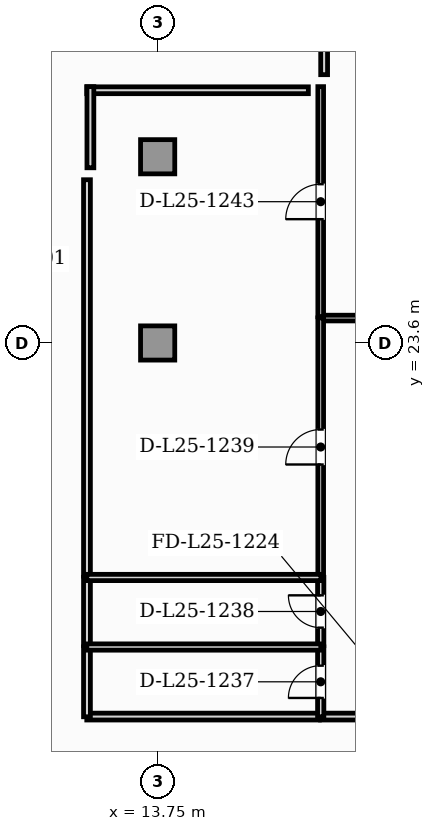
"""IFC4 building model, lengths in metres.
Left out: names, types, materials, properties, quantities, classifications, styles, units other than length and angle.
Written with IfcOpenShell. Run it as: python <this file> out.ifc"""

import sys

from ifc_helpers import new_model, si_unit, direction, frame, frame_2d, origin, origin_2d, place, context, subcontext, project, spatial, rectangle, extrude, element, fill, save


model = new_model("IFC4")
c1 = context("Model", 3, precision=1e-05, world=origin(), true_north=direction((0.0, 1.0)))
c2 = subcontext(c1, "Body", "Model", "MODEL_VIEW")
j1 = project(units=[si_unit("LENGTHUNIT", "METRE"), si_unit("PLANEANGLEUNIT", "RADIAN")], contexts=[c1])
p1 = place(None, origin())
s1 = spatial("IfcSite", under=j1, at=p1, CompositionType="ELEMENT")
p2 = place(p1, origin())
s2 = spatial("IfcBuilding", under=s1, at=p2, CompositionType="ELEMENT")
p3 = place(p2, frame((0.0, 0.0, 104.15)))
s3 = spatial("IfcBuildingStorey", under=s2, at=p3, CompositionType="ELEMENT", Elevation=104.15)
for number, where, z_axis, x_axis in (
    (1, (13.75, 23.6, 0.0), (0.0, 0.0, 1.0), (1.0, 0.0, 0.0)),
    (2, (13.75, 28.5, 0.0), (0.0, 0.0, 1.0), (1.0, 0.0, 0.0)),
):
    element("IfcColumn", number, at=place(p3, frame(where, z_axis=z_axis, x_axis=x_axis)), inside=s3, PredefinedType="COLUMN", context=c2, shape_type="SweptSolid", body=[
        extrude(rectangle(XDim=0.9, YDim=0.9, at=origin_2d()), origin(), (0.0, 0.0, 1.0), 3.85),
    ])
p4 = place(p3, frame((18.035, 13.77, 0.0), z_axis=(0.0, 0.0, 1.0), x_axis=(1.0, 0.0, 0.0)))
e3 = element("IfcWall", 3, at=p4, inside=s3, PredefinedType="PARTITIONING", context=c2, shape_type="SweptSolid", body=[
    extrude(rectangle(XDim=4.99, YDim=0.18, at=frame_2d((2.495, 0.0))), origin(), (0.0, 0.0, 1.0), 3.6),
])
p5 = place(p4, frame((1.995, 0.0, 0.0)))
e4 = element("IfcOpeningElement", 4, at=p5, cuts=e3, PredefinedType="OPENING", context=c2, shape_type="SweptSolid", body=[
    extrude(rectangle(XDim=1.0, YDim=2.15, at=frame_2d((0.5, 1.075))), frame((0.0, 0.1, 0.0), z_axis=(0.0, -1.0, 0.0), x_axis=(1.0, 0.0, 0.0)), (0.0, 0.0, 1.0), 0.2),
])
p6 = place(p3, frame((11.885, 13.77, 0.0), z_axis=(0.0, 0.0, 1.0), x_axis=(1.0, 0.0, 0.0)))
e5 = element("IfcWall", 5, at=p6, inside=s3, PredefinedType="PARTITIONING", context=c2, shape_type="SweptSolid", body=[
    extrude(rectangle(XDim=6.12, YDim=0.18, at=frame_2d((3.06, 0.0))), origin(), (0.0, 0.0, 1.0), 3.6),
])
p7 = place(p3, frame((11.89, 13.765, 0.0), z_axis=(0.0, 0.0, 1.0), x_axis=(0.0, 1.0, 0.0)))
e6 = element("IfcWall", 6, at=p7, inside=s3, PredefinedType="PARTITIONING", context=c2, shape_type="SweptSolid", body=[
    extrude(rectangle(XDim=1.84, YDim=0.18, at=frame_2d((0.92, 0.0))), origin(), (0.0, 0.0, 1.0), 3.6),
])
p8 = place(p3, frame((11.89, 15.635, 0.0), z_axis=(0.0, 0.0, 1.0), x_axis=(0.0, 1.0, 0.0)))
e7 = element("IfcWall", 7, at=p8, inside=s3, PredefinedType="PARTITIONING", context=c2, shape_type="SweptSolid", body=[
    extrude(rectangle(XDim=1.8, YDim=0.18, at=frame_2d((0.9, 0.0))), origin(), (0.0, 0.0, 1.0), 3.6),
])
p9 = place(p3, frame((11.89, 17.465, 0.0), z_axis=(0.0, 0.0, 1.0), x_axis=(0.0, 1.0, 0.0)))
e8 = element("IfcWall", 8, at=p9, inside=s3, PredefinedType="PARTITIONING", context=c2, shape_type="SweptSolid", body=[
    extrude(rectangle(XDim=10.43, YDim=0.18, at=frame_2d((5.215, 0.0))), origin(), (0.0, 0.0, 1.0), 3.6),
])
p10 = place(p3, frame((18.035, 24.256, 0.0), z_axis=(0.0, 0.0, 1.0), x_axis=(1.0, 0.0, 0.0)))
e9 = element("IfcWall", 9, at=p10, inside=s3, PredefinedType="PARTITIONING", context=c2, shape_type="SweptSolid", body=[
    extrude(rectangle(XDim=4.99, YDim=0.15, at=frame_2d((2.495, 0.0))), origin(), (0.0, 0.0, 1.0), 3.6),
])
p11 = place(p10, frame((1.287, 0.0, 0.0)))
e10 = element("IfcOpeningElement", 10, at=p11, cuts=e9, PredefinedType="OPENING", context=c2, shape_type="SweptSolid", body=[
    extrude(rectangle(XDim=0.92, YDim=2.1, at=frame_2d((0.46, 1.05))), frame((0.0, 0.085, 0.0), z_axis=(0.0, -1.0, 0.0), x_axis=(1.0, 0.0, 0.0)), (0.0, 0.0, 1.0), 0.17),
])
p12 = place(p3, frame((18.04, 13.765, 0.0), z_axis=(0.0, 0.0, 1.0), x_axis=(0.0, 1.0, 0.0)))
e11 = element("IfcWall", 11, at=p12, inside=s3, PredefinedType="PLUMBINGWALL", context=c2, shape_type="SweptSolid", body=[
    extrude(rectangle(XDim=1.84, YDim=0.165, at=frame_2d((0.92, 0.0))), origin(), (0.0, 0.0, 1.0), 3.6),
])
p13 = place(p12, frame((0.495, 0.0, 0.0)))
e12 = element("IfcOpeningElement", 12, at=p13, cuts=e11, PredefinedType="OPENING", context=c2, shape_type="SweptSolid", body=[
    extrude(rectangle(XDim=0.85, YDim=2.1, at=frame_2d((0.425, 1.05))), frame((0.0, 0.093, 0.0), z_axis=(0.0, -1.0, 0.0), x_axis=(1.0, 0.0, 0.0)), (0.0, 0.0, 1.0), 0.185),
])
p14 = place(p3, frame((18.04, 15.635, 0.0), z_axis=(0.0, 0.0, 1.0), x_axis=(0.0, 1.0, 0.0)))
e13 = element("IfcWall", 13, at=p14, inside=s3, PredefinedType="PLUMBINGWALL", context=c2, shape_type="SweptSolid", body=[
    extrude(rectangle(XDim=1.8, YDim=0.165, at=frame_2d((0.9, 0.0))), origin(), (0.0, 0.0, 1.0), 3.6),
])
p15 = place(p14, frame((0.475, 0.0, 0.0)))
e14 = element("IfcOpeningElement", 14, at=p15, cuts=e13, PredefinedType="OPENING", context=c2, shape_type="SweptSolid", body=[
    extrude(rectangle(XDim=0.85, YDim=2.1, at=frame_2d((0.425, 1.05))), frame((0.0, 0.093, 0.0), z_axis=(0.0, -1.0, 0.0), x_axis=(1.0, 0.0, 0.0)), (0.0, 0.0, 1.0), 0.185),
])
p16 = place(p3, frame((18.04, 17.465, 0.0), z_axis=(0.0, 0.0, 1.0), x_axis=(0.0, 1.0, 0.0)))
e15 = element("IfcWall", 15, at=p16, inside=s3, PredefinedType="PARTITIONING", context=c2, shape_type="SweptSolid", body=[
    extrude(rectangle(XDim=6.795, YDim=0.15, at=frame_2d((3.398, 0.0))), origin(), (0.0, 0.0, 1.0), 3.6),
])
p17 = place(p16, frame((2.938, 0.0, 0.0)))
e16 = element("IfcOpeningElement", 16, at=p17, cuts=e15, PredefinedType="OPENING", context=c2, shape_type="SweptSolid", body=[
    extrude(rectangle(XDim=0.92, YDim=2.1, at=frame_2d((0.46, 1.05))), frame((0.0, 0.085, 0.0), z_axis=(0.0, -1.0, 0.0), x_axis=(1.0, 0.0, 0.0)), (0.0, 0.0, 1.0), 0.17),
])
p18 = place(p3, frame((18.04, 24.291, 0.0), z_axis=(0.0, 0.0, 1.0), x_axis=(0.0, 1.0, 0.0)))
e17 = element("IfcWall", 17, at=p18, inside=s3, PredefinedType="PARTITIONING", context=c2, shape_type="SweptSolid", body=[
    extrude(rectangle(XDim=6.054, YDim=0.15, at=frame_2d((3.027, 0.0))), origin(), (0.0, 0.0, 1.0), 3.6),
])
p19 = place(p18, frame((2.567, 0.0, 0.0)))
e18 = element("IfcOpeningElement", 18, at=p19, cuts=e17, PredefinedType="OPENING", context=c2, shape_type="SweptSolid", body=[
    extrude(rectangle(XDim=0.92, YDim=2.1, at=frame_2d((0.46, 1.05))), frame((0.0, 0.085, 0.0), z_axis=(0.0, -1.0, 0.0), x_axis=(1.0, 0.0, 0.0)), (0.0, 0.0, 1.0), 0.17),
])
for number, where, z_axis, x_axis in (
    (19, (11.885, 15.6, 0.0), (0.0, 0.0, 1.0), (1.0, 0.0, 0.0)),
    (20, (11.885, 17.43, 0.0), (0.0, 0.0, 1.0), (1.0, 0.0, 0.0)),
):
    element("IfcWall", number, at=place(p3, frame(where, z_axis=z_axis, x_axis=x_axis)), inside=s3, PredefinedType="PLUMBINGWALL", context=c2, shape_type="SweptSolid", body=[
        extrude(rectangle(XDim=6.16, YDim=0.165, at=frame_2d((3.08, 0.0))), origin(), (0.0, 0.0, 1.0), 3.6),
    ])
p20 = place(p3, frame((18.13, 30.66, 0.0), z_axis=(0.0, 0.0, 1.0), x_axis=(0.0, 1.0, 0.0)))
e21 = element("IfcWall", 21, at=p20, inside=s3, PredefinedType="PARTITIONING", context=c2, shape_type="SweptSolid", body=[
    extrude(rectangle(XDim=3.025, YDim=0.18, at=frame_2d((1.513, 0.0))), origin(), (0.0, 0.0, 1.0), 3.6),
])
p21 = place(p3, frame((11.885, 30.25, 0.0), z_axis=(0.0, 0.0, 1.0), x_axis=(1.0, 0.0, 0.0)))
e22 = element("IfcWall", 22, at=p21, inside=s3, PredefinedType="PARTITIONING", context=c2, shape_type="SweptSolid", body=[
    extrude(rectangle(XDim=5.83, YDim=0.18, at=frame_2d((2.915, 0.0))), origin(), (0.0, 0.0, 1.0), 3.6),
])
p22 = place(p3, frame((11.98, 28.21, 0.0), z_axis=(0.0, 0.0, 1.0), x_axis=(0.0, 1.0, 0.0)))
e23 = element("IfcWall", 23, at=p22, inside=s3, PredefinedType="PARTITIONING", context=c2, shape_type="SweptSolid", body=[
    extrude(rectangle(XDim=2.135, YDim=0.18, at=frame_2d((1.067, 0.0))), origin(), (0.0, 0.0, 1.0), 3.6),
])
p23 = place(p13, origin())
e24 = element("IfcDoor", 24, at=p23, inside=s3, OperationType="SINGLE_SWING_LEFT", PredefinedType="DOOR", context=c2, shape_type="SweptSolid", body=[
    extrude(rectangle(XDim=0.85, YDim=2.1, at=frame_2d((0.425, 1.05))), frame((0.0, 0.025, 0.0), z_axis=(0.0, -1.0, 0.0), x_axis=(1.0, 0.0, 0.0)), (0.0, 0.0, 1.0), 0.05),
])
fill(e12, e24)
p24 = place(p15, origin())
e25 = element("IfcDoor", 25, at=p24, inside=s3, OperationType="SINGLE_SWING_RIGHT", PredefinedType="DOOR", context=c2, shape_type="SweptSolid", body=[
    extrude(rectangle(XDim=0.85, YDim=2.1, at=frame_2d((0.425, 1.05))), frame((0.0, 0.025, 0.0), z_axis=(0.0, -1.0, 0.0), x_axis=(1.0, 0.0, 0.0)), (0.0, 0.0, 1.0), 0.05),
])
fill(e14, e25)
p25 = place(p17, origin())
e26 = element("IfcDoor", 26, at=p25, inside=s3, OperationType="SINGLE_SWING_LEFT", PredefinedType="DOOR", context=c2, shape_type="SweptSolid", body=[
    extrude(rectangle(XDim=0.92, YDim=2.1, at=frame_2d((0.46, 1.05))), frame((0.0, 0.025, 0.0), z_axis=(0.0, -1.0, 0.0), x_axis=(1.0, 0.0, 0.0)), (0.0, 0.0, 1.0), 0.05),
])
fill(e16, e26)
p26 = place(p19, origin())
e27 = element("IfcDoor", 27, at=p26, inside=s3, OperationType="SINGLE_SWING_LEFT", PredefinedType="DOOR", context=c2, shape_type="SweptSolid", body=[
    extrude(rectangle(XDim=0.92, YDim=2.1, at=frame_2d((0.46, 1.05))), frame((0.0, 0.025, 0.0), z_axis=(0.0, -1.0, 0.0), x_axis=(1.0, 0.0, 0.0)), (0.0, 0.0, 1.0), 0.05),
])
fill(e18, e27)
save(model, sys.argv[1])
